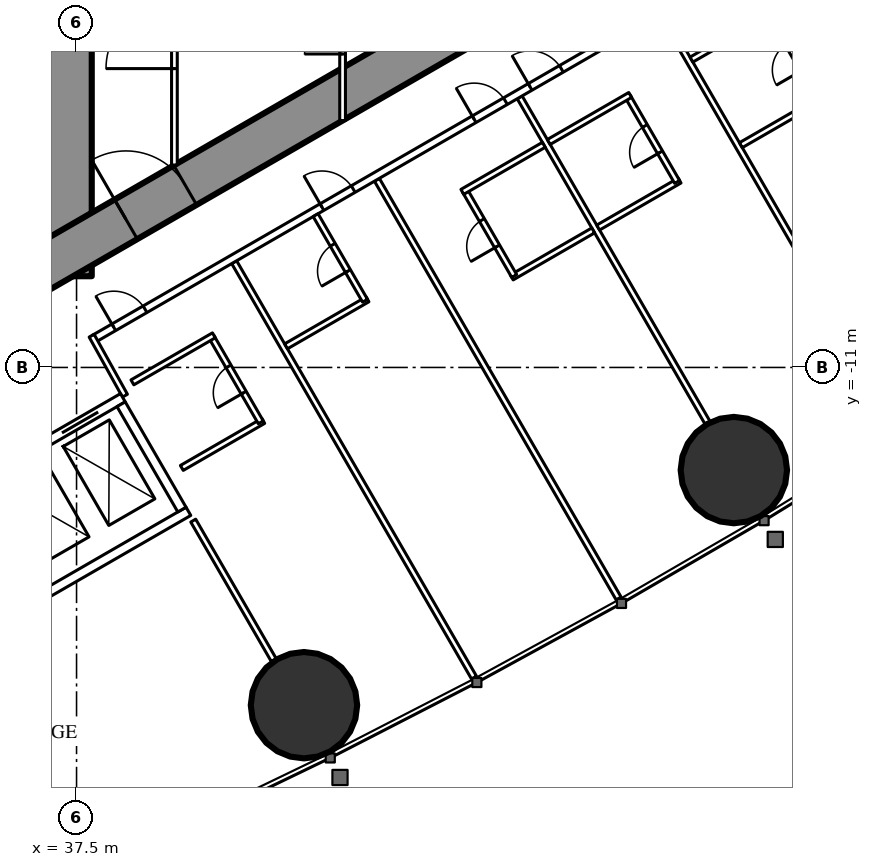
"""IFC4 building model, lengths in metres.
Left out: names, types, materials, properties, quantities, classifications, styles, units other than length and angle.
Written with IfcOpenShell. Run it as: python <this file> out.ifc"""

import sys

from ifc_helpers import new_model, si_unit, direction, frame, frame_2d, origin, origin_2d, place, context, subcontext, project, spatial, rectangle, hollow_circle, extrude, element, fill, save


model = new_model("IFC4")
c1 = context("Model", 3, precision=1e-05, world=origin(), true_north=direction((0.0, 1.0)))
c2 = subcontext(c1, "Body", "Model", "MODEL_VIEW")
j1 = project(units=[si_unit("LENGTHUNIT", "METRE"), si_unit("PLANEANGLEUNIT", "RADIAN")], contexts=[c1])
p1 = place(None, origin())
s1 = spatial("IfcSite", under=j1, at=p1, CompositionType="ELEMENT")
p2 = place(p1, origin())
s2 = spatial("IfcBuilding", under=s1, at=p2, CompositionType="ELEMENT")
p3 = place(p2, frame((0.0, 0.0, 53.0)))
s3 = spatial("IfcBuildingStorey", under=s2, at=p3, CompositionType="ELEMENT", Elevation=53.0)
for number, where, z_axis, x_axis in (
    (1, (43.484, -19.886, 0.0), (0.0, 0.0, 1.0), (1.0, 0.0, 0.0)),
    (2, (54.795, -13.701, 0.0), (0.0, 0.0, 1.0), (1.0, 0.0, 0.0)),
):
    element("IfcColumn", number, at=place(p3, frame(where, z_axis=z_axis, x_axis=x_axis)), inside=s3, PredefinedType="COLUMN", context=c2, shape_type="SweptSolid", body=[
        extrude(hollow_circle(Radius=1.4, WallThickness=0.12, at=origin_2d()), origin(), (0.0, 0.0, 1.0), 3.5),
    ])
p4 = place(p3, frame((37.3, -8.6, 0.0), z_axis=(0.0, 0.0, 1.0), x_axis=(0.0, 1.0, 0.0)))
e3 = element("IfcWall", 3, at=p4, inside=s3, PredefinedType="SHEAR", context=c2, shape_type="SweptSolid", body=[
    extrude(rectangle(XDim=17.2, YDim=1.2, at=frame_2d((8.6, 0.0))), origin(), (0.0, 0.0, 1.0), 3.5),
])
p5 = place(p4, frame((7.7, 0.0, 0.0)))
e4 = element("IfcOpeningElement", 4, at=p5, cuts=e3, PredefinedType="OPENING", context=c2, shape_type="SweptSolid", body=[
    extrude(rectangle(XDim=1.8, YDim=2.2, at=frame_2d((0.9, 1.1))), frame((0.0, 0.61, 0.0), z_axis=(0.0, -1.0, 0.0), x_axis=(1.0, 0.0, 0.0)), (0.0, 0.0, 1.0), 1.22),
])
p6 = place(p3, frame((27.2, -13.8, 0.0), z_axis=(0.0, 0.0, 1.0), x_axis=(0.866027159892, 0.499996958321, 0.0)))
e5 = element("IfcWall", 5, at=p6, inside=s3, PredefinedType="SHEAR", context=c2, shape_type="SweptSolid", body=[
    extrude(rectangle(XDim=27.947, YDim=1.2, at=frame_2d((13.973, 0.0))), origin(), (0.0, 0.0, 1.0), 3.5),
])
p7 = place(p6, frame((4.6, 0.0, 0.0)))
e6 = element("IfcOpeningElement", 6, at=p7, cuts=e5, PredefinedType="OPENING", context=c2, shape_type="SweptSolid", body=[
    extrude(rectangle(XDim=1.0, YDim=2.2, at=frame_2d((0.5, 1.1))), frame((0.0, 0.61, 0.0), z_axis=(0.0, -1.0, 0.0), x_axis=(1.0, 0.0, 0.0)), (0.0, 0.0, 1.0), 1.22),
])
p8 = place(p6, frame((13.395, 0.0, 0.0)))
e7 = element("IfcOpeningElement", 7, at=p8, cuts=e5, PredefinedType="OPENING", context=c2, shape_type="SweptSolid", body=[
    extrude(rectangle(XDim=1.8, YDim=2.2, at=frame_2d((0.9, 1.1))), frame((0.0, 0.61, 0.0), z_axis=(0.0, -1.0, 0.0), x_axis=(1.0, 0.0, 0.0)), (0.0, 0.0, 1.0), 1.22),
])
p9 = place(p3, frame((41.647, -8.23, 0.0), z_axis=(0.0, 0.0, 1.0), x_axis=(0.49998590462, -0.866033541603, 0.0)))
e8 = element("IfcWall", 8, at=p9, inside=s3, PredefinedType="PARTITIONING", context=c2, shape_type="SweptSolid", body=[
    extrude(rectangle(XDim=12.621, YDim=0.15, at=frame_2d((6.311, 0.0))), origin(), (0.0, 0.0, 1.0), 3.25),
])
p10 = place(p3, frame((45.403, -6.062, 0.0), z_axis=(0.0, 0.0, 1.0), x_axis=(0.500007077968, -0.866021317279, 0.0)))
e9 = element("IfcWall", 9, at=p10, inside=s3, PredefinedType="PARTITIONING", context=c2, shape_type="SweptSolid", body=[
    extrude(rectangle(XDim=12.721, YDim=0.15, at=frame_2d((6.361, 0.0))), origin(), (0.0, 0.0, 1.0), 3.25),
])
p11 = place(p3, frame((49.159, -3.893, 0.0), z_axis=(0.0, 0.0, 1.0), x_axis=(0.499998773722, -0.866026111775, 0.0)))
e10 = element("IfcWall", 10, at=p11, inside=s3, PredefinedType="PARTITIONING", context=c2, shape_type="SweptSolid", body=[
    extrude(rectangle(XDim=9.892, YDim=0.15, at=frame_2d((4.946, 0.0))), origin(), (0.0, 0.0, 1.0), 2.25),
])
p12 = place(p3, frame((52.915, -1.725, 0.0), z_axis=(0.0, 0.0, 1.0), x_axis=(0.499997163113, -0.866027041656, 0.0)))
e11 = element("IfcWall", 11, at=p12, inside=s3, PredefinedType="PARTITIONING", context=c2, shape_type="SweptSolid", body=[
    extrude(rectangle(XDim=12.591, YDim=0.15, at=frame_2d((6.295, 0.0))), origin(), (0.0, 0.0, 1.0), 3.25),
])
p13 = place(p3, frame((40.57, -15.03, 0.0), z_axis=(0.0, 0.0, 1.0), x_axis=(0.500012993597, -0.866017901798, 0.0)))
e12 = element("IfcWall", 12, at=p13, inside=s3, PredefinedType="PARTITIONING", context=c2, shape_type="SweptSolid", body=[
    extrude(rectangle(XDim=4.243, YDim=0.15, at=frame_2d((2.122, 0.0))), origin(), (0.0, 0.0, 1.0), 3.25),
])
p14 = place(p3, frame((37.96, -10.243, 0.0), z_axis=(0.0, 0.0, 1.0), x_axis=(0.866026429433, 0.499998223521, 0.0)))
e13 = element("IfcWall", 13, at=p14, inside=s3, PredefinedType="PARTITIONING", context=c2, shape_type="SweptSolid", body=[
    extrude(rectangle(XDim=20.487, YDim=0.2, at=frame_2d((10.243, 0.0))), origin(), (0.0, 0.0, 1.0), 3.25),
])
p15 = place(p14, frame((6.925, 0.0, 0.0)))
e14 = element("IfcOpeningElement", 14, at=p15, cuts=e13, PredefinedType="OPENING", context=c2, shape_type="SweptSolid", body=[
    extrude(rectangle(XDim=0.95, YDim=2.2, at=frame_2d((0.475, 1.1))), frame((0.0, 0.11, 0.0), z_axis=(0.0, -1.0, 0.0), x_axis=(1.0, 0.0, 0.0)), (0.0, 0.0, 1.0), 0.22),
])
p16 = place(p14, frame((11.549, 0.0, 0.0)))
e15 = element("IfcOpeningElement", 15, at=p16, cuts=e13, PredefinedType="OPENING", context=c2, shape_type="SweptSolid", body=[
    extrude(rectangle(XDim=0.95, YDim=2.2, at=frame_2d((0.475, 1.1))), frame((0.0, 0.11, 0.0), z_axis=(0.0, -1.0, 0.0), x_axis=(1.0, 0.0, 0.0)), (0.0, 0.0, 1.0), 0.22),
])
p17 = place(p14, frame((13.249, 0.0, 0.0)))
e16 = element("IfcOpeningElement", 16, at=p17, cuts=e13, PredefinedType="OPENING", context=c2, shape_type="SweptSolid", body=[
    extrude(rectangle(XDim=0.95, YDim=2.2, at=frame_2d((0.475, 1.1))), frame((0.0, 0.11, 0.0), z_axis=(0.0, -1.0, 0.0), x_axis=(1.0, 0.0, 0.0)), (0.0, 0.0, 1.0), 0.22),
])
p18 = place(p14, frame((17.585, 0.0, 0.0)))
e17 = element("IfcOpeningElement", 17, at=p18, cuts=e13, PredefinedType="OPENING", context=c2, shape_type="SweptSolid", body=[
    extrude(rectangle(XDim=0.95, YDim=2.2, at=frame_2d((0.475, 1.1))), frame((0.0, 0.11, 0.0), z_axis=(0.0, -1.0, 0.0), x_axis=(1.0, 0.0, 0.0)), (0.0, 0.0, 1.0), 0.22),
])
p19 = place(p14, frame((0.6, 0.0, 0.0)))
e18 = element("IfcOpeningElement", 18, at=p19, cuts=e13, PredefinedType="OPENING", context=c2, shape_type="SweptSolid", body=[
    extrude(rectangle(XDim=0.95, YDim=2.2, at=frame_2d((0.475, 1.1))), frame((0.0, 0.11, 0.0), z_axis=(0.0, -1.0, 0.0), x_axis=(1.0, 0.0, 0.0)), (0.0, 0.0, 1.0), 0.22),
])
p20 = place(p3, frame((38.773, -11.742, 0.0), z_axis=(0.0, 0.0, 1.0), x_axis=(-0.485528096672, 0.8742210632, 0.0)))
e19 = element("IfcWall", 19, at=p20, inside=s3, PredefinedType="PARTITIONING", context=c2, shape_type="SweptSolid", body=[
    extrude(rectangle(XDim=1.805, YDim=0.15, at=frame_2d((0.903, 0.0))), origin(), (0.0, 0.0, 1.0), 3.25),
])
p21 = place(p3, frame((43.012, -10.444, 0.0), z_axis=(0.0, 0.0, 1.0), x_axis=(0.866031185235, 0.4999899861, 0.0)))
e20 = element("IfcWall", 20, at=p21, inside=s3, PredefinedType="PARTITIONING", context=c2, shape_type="SweptSolid", body=[
    extrude(rectangle(XDim=2.475, YDim=0.15, at=frame_2d((1.238, 0.0))), origin(), (0.0, 0.0, 1.0), 3.25),
])
p22 = place(p3, frame((43.791, -6.993, 0.0), z_axis=(0.0, 0.0, 1.0), x_axis=(0.500047596559, -0.865997922154, 0.0)))
e21 = element("IfcWall", 21, at=p22, inside=s3, PredefinedType="PARTITIONING", context=c2, shape_type="SweptSolid", body=[
    extrude(rectangle(XDim=2.6, YDim=0.15, at=frame_2d((1.3, 0.0))), origin(), (0.0, 0.0, 1.0), 3.25),
])
p23 = place(p22, frame((0.9, 0.0, 0.0)))
e22 = element("IfcOpeningElement", 22, at=p23, cuts=e21, PredefinedType="OPENING", context=c2, shape_type="SweptSolid", body=[
    extrude(rectangle(XDim=0.8, YDim=2.2, at=frame_2d((0.4, 1.1))), frame((0.0, 0.085, 0.0), z_axis=(0.0, -1.0, 0.0), x_axis=(1.0, 0.0, 0.0)), (0.0, 0.0, 1.0), 0.17),
])
p24 = place(p3, frame((48.951, -8.632, 0.0), z_axis=(0.0, 0.0, 1.0), x_axis=(0.866006523861, 0.500032699561, 0.0)))
e23 = element("IfcWall", 23, at=p24, inside=s3, PredefinedType="PARTITIONING", context=c2, shape_type="SweptSolid", body=[
    extrude(rectangle(XDim=2.475, YDim=0.15, at=frame_2d((1.237, 0.0))), origin(), (0.0, 0.0, 1.0), 3.25),
])
p25 = place(p3, frame((47.716, -6.343, 0.0), z_axis=(0.0, 0.0, 1.0), x_axis=(0.500006934395, -0.866021400173, 0.0)))
e24 = element("IfcWall", 24, at=p25, inside=s3, PredefinedType="PARTITIONING", context=c2, shape_type="SweptSolid", body=[
    extrude(rectangle(XDim=2.6, YDim=0.15, at=frame_2d((1.3, 0.0))), origin(), (0.0, 0.0, 1.0), 3.25),
])
p26 = place(p25, frame((0.9, 0.0, 0.0)))
e25 = element("IfcOpeningElement", 25, at=p26, cuts=e24, PredefinedType="OPENING", context=c2, shape_type="SweptSolid", body=[
    extrude(rectangle(XDim=0.8, YDim=2.2, at=frame_2d((0.4, 1.1))), frame((0.0, 0.085, 0.0), z_axis=(0.0, -1.0, 0.0), x_axis=(1.0, 0.0, 0.0)), (0.0, 0.0, 1.0), 0.17),
])
for number, where, z_axis, x_axis in (
    (26, (47.651, -6.38, 0.0), (0.0, 0.0, 1.0), (0.866, 0.5, 0.0)),
    (27, (51.224, -7.32, 0.0), (0.0, 0.0, 1.0), (0.866, 0.5, 0.0)),
):
    element("IfcWall", number, at=place(p3, frame(where, z_axis=z_axis, x_axis=x_axis)), inside=s3, PredefinedType="PARTITIONING", context=c2, shape_type="SweptSolid", body=[
        extrude(rectangle(XDim=2.475, YDim=0.15, at=frame_2d((1.238, 0.0))), origin(), (0.0, 0.0, 1.0), 3.25),
    ])
p27 = place(p3, frame((52.003, -3.868, 0.0), z_axis=(0.0, 0.0, 1.0), x_axis=(0.500047596559, -0.865997922154, 0.0)))
e28 = element("IfcWall", 28, at=p27, inside=s3, PredefinedType="PARTITIONING", context=c2, shape_type="SweptSolid", body=[
    extrude(rectangle(XDim=2.6, YDim=0.15, at=frame_2d((1.3, 0.0))), origin(), (0.0, 0.0, 1.0), 3.25),
])
p28 = place(p27, frame((0.9, 0.0, 0.0)))
e29 = element("IfcOpeningElement", 29, at=p28, cuts=e28, PredefinedType="OPENING", context=c2, shape_type="SweptSolid", body=[
    extrude(rectangle(XDim=0.8, YDim=2.2, at=frame_2d((0.4, 1.1))), frame((0.0, 0.085, 0.0), z_axis=(0.0, -1.0, 0.0), x_axis=(1.0, 0.0, 0.0)), (0.0, 0.0, 1.0), 0.17),
])
for number, where, z_axis, x_axis in (
    (30, (49.925, -5.068, 0.0), (0.0, 0.0, 1.0), (0.866, 0.5, 0.0)),
    (31, (54.98, -5.151, 0.0), (0.0, 0.0, 1.0), (0.866, 0.5, 0.0)),
):
    element("IfcWall", number, at=place(p3, frame(where, z_axis=z_axis, x_axis=x_axis)), inside=s3, PredefinedType="PARTITIONING", context=c2, shape_type="SweptSolid", body=[
        extrude(rectangle(XDim=2.475, YDim=0.15, at=frame_2d((1.237, 0.0))), origin(), (0.0, 0.0, 1.0), 3.25),
    ])
p29 = place(p3, frame((55.758, -1.7, 0.0), z_axis=(0.0, 0.0, 1.0), x_axis=(0.500006934395, -0.866021400173, 0.0)))
e32 = element("IfcWall", 32, at=p29, inside=s3, PredefinedType="PARTITIONING", context=c2, shape_type="SweptSolid", body=[
    extrude(rectangle(XDim=2.6, YDim=0.15, at=frame_2d((1.3, 0.0))), origin(), (0.0, 0.0, 1.0), 3.25),
])
p30 = place(p29, frame((0.9, 0.0, 0.0)))
e33 = element("IfcOpeningElement", 33, at=p30, cuts=e32, PredefinedType="OPENING", context=c2, shape_type="SweptSolid", body=[
    extrude(rectangle(XDim=0.8, YDim=2.2, at=frame_2d((0.4, 1.1))), frame((0.0, 0.085, 0.0), z_axis=(0.0, -1.0, 0.0), x_axis=(1.0, 0.0, 0.0)), (0.0, 0.0, 1.0), 0.17),
])
p31 = place(p3, frame((53.68, -2.9, 0.0), z_axis=(0.0, 0.0, 1.0), x_axis=(0.866006523861, 0.500032699561, 0.0)))
e34 = element("IfcWall", 34, at=p31, inside=s3, PredefinedType="PARTITIONING", context=c2, shape_type="SweptSolid", body=[
    extrude(rectangle(XDim=2.475, YDim=0.15, at=frame_2d((1.237, 0.0))), origin(), (0.0, 0.0, 1.0), 3.25),
])
p32 = place(p3, frame((40.27, -13.644, 0.0), z_axis=(0.0, 0.0, 1.0), x_axis=(0.866031185235, 0.4999899861, 0.0)))
e35 = element("IfcWall", 35, at=p32, inside=s3, PredefinedType="PARTITIONING", context=c2, shape_type="SweptSolid", body=[
    extrude(rectangle(XDim=2.475, YDim=0.15, at=frame_2d((1.238, 0.0))), origin(), (0.0, 0.0, 1.0), 3.25),
])
p33 = place(p3, frame((41.048, -10.193, 0.0), z_axis=(0.0, 0.0, 1.0), x_axis=(0.500047596559, -0.865997922154, 0.0)))
e36 = element("IfcWall", 36, at=p33, inside=s3, PredefinedType="PARTITIONING", context=c2, shape_type="SweptSolid", body=[
    extrude(rectangle(XDim=2.6, YDim=0.15, at=frame_2d((1.3, 0.0))), origin(), (0.0, 0.0, 1.0), 3.25),
])
p34 = place(p33, frame((0.9, 0.0, 0.0)))
e37 = element("IfcOpeningElement", 37, at=p34, cuts=e36, PredefinedType="OPENING", context=c2, shape_type="SweptSolid", body=[
    extrude(rectangle(XDim=0.8, YDim=2.2, at=frame_2d((0.4, 1.1))), frame((0.0, 0.085, 0.0), z_axis=(0.0, -1.0, 0.0), x_axis=(1.0, 0.0, 0.0)), (0.0, 0.0, 1.0), 0.17),
])
p35 = place(p3, frame((38.97, -11.393, 0.0), z_axis=(0.0, 0.0, 1.0), x_axis=(0.866031185235, 0.4999899861, 0.0)))
e38 = element("IfcWall", 38, at=p35, inside=s3, PredefinedType="PARTITIONING", context=c2, shape_type="SweptSolid", body=[
    extrude(rectangle(XDim=2.475, YDim=0.15, at=frame_2d((1.238, 0.0))), origin(), (0.0, 0.0, 1.0), 3.25),
])
p36 = place(p3, frame((40.075, -5.674, 0.0), z_axis=(0.0, 0.0, 1.0), x_axis=(0.0, 1.0, 0.0)))
e39 = element("IfcWall", 39, at=p36, inside=s3, PredefinedType="PARTITIONING", context=c2, shape_type="SweptSolid", body=[
    extrude(rectangle(XDim=6.874, YDim=0.15, at=frame_2d((3.437, 0.0))), origin(), (0.0, 0.0, 1.0), 3.25),
])
p37 = place(p36, frame((2.537, 0.0, 0.0)))
e40 = element("IfcOpeningElement", 40, at=p37, cuts=e39, PredefinedType="OPENING", context=c2, shape_type="SweptSolid", body=[
    extrude(rectangle(XDim=1.8, YDim=2.2, at=frame_2d((0.9, 1.1))), frame((0.0, 0.085, 0.0), z_axis=(0.0, -1.0, 0.0), x_axis=(1.0, 0.0, 0.0)), (0.0, 0.0, 1.0), 0.17),
])
p38 = place(p3, frame((44.5, -4.505, 0.0), z_axis=(0.0, 0.0, 1.0), x_axis=(0.0, 1.0, 0.0)))
e41 = element("IfcWall", 41, at=p38, inside=s3, PredefinedType="PARTITIONING", context=c2, shape_type="SweptSolid", body=[
    extrude(rectangle(XDim=9.009, YDim=0.15, at=frame_2d((4.505, 0.0))), origin(), (0.0, 0.0, 1.0), 2.45),
])
p39 = place(p38, frame((1.752, 0.0, 0.0)))
e42 = element("IfcOpeningElement", 42, at=p39, cuts=e41, PredefinedType="OPENING", context=c2, shape_type="SweptSolid", body=[
    extrude(rectangle(XDim=1.0, YDim=2.2, at=frame_2d((0.5, 1.1))), frame((0.0, 0.085, 0.0), z_axis=(0.0, -1.0, 0.0), x_axis=(1.0, 0.0, 0.0)), (0.0, 0.0, 1.0), 0.17),
])
p40 = place(p38, frame((6.257, 0.0, 0.0)))
e43 = element("IfcOpeningElement", 43, at=p40, cuts=e41, PredefinedType="OPENING", context=c2, shape_type="SweptSolid", body=[
    extrude(rectangle(XDim=1.0, YDim=2.2, at=frame_2d((0.5, 1.1))), frame((0.0, 0.085, 0.0), z_axis=(0.0, -1.0, 0.0), x_axis=(1.0, 0.0, 0.0)), (0.0, 0.0, 1.0), 0.17),
])
p41 = place(p3, frame((31.271, -16.097, 0.0), z_axis=(0.0, 0.0, 1.0), x_axis=(0.86604045752, 0.499973925258, 0.0)))
e44 = element("IfcWall", 44, at=p41, inside=s3, PredefinedType="PARTITIONING", context=c2, shape_type="SweptSolid", body=[
    extrude(rectangle(XDim=8.6, YDim=0.25, at=frame_2d((4.3, 0.0))), origin(), (0.0, 0.0, 1.0), 3.25),
])
p42 = place(p41, frame((0.75, 0.0, 0.0)))
e45 = element("IfcOpeningElement", 45, at=p42, cuts=e44, PredefinedType="OPENING", context=c2, shape_type="SweptSolid", body=[
    extrude(rectangle(XDim=1.1, YDim=2.2, at=frame_2d((0.55, 1.1))), frame((0.0, 0.135, 0.0), z_axis=(0.0, -1.0, 0.0), x_axis=(1.0, 0.0, 0.0)), (0.0, 0.0, 1.0), 0.27),
])
p43 = place(p41, frame((2.75, 0.0, 0.0)))
e46 = element("IfcOpeningElement", 46, at=p43, cuts=e44, PredefinedType="OPENING", context=c2, shape_type="SweptSolid", body=[
    extrude(rectangle(XDim=1.1, YDim=2.2, at=frame_2d((0.55, 1.1))), frame((0.0, 0.135, 0.0), z_axis=(0.0, -1.0, 0.0), x_axis=(1.0, 0.0, 0.0)), (0.0, 0.0, 1.0), 0.27),
])
p44 = place(p41, frame((4.75, 0.0, 0.0)))
e47 = element("IfcOpeningElement", 47, at=p44, cuts=e44, PredefinedType="OPENING", context=c2, shape_type="SweptSolid", body=[
    extrude(rectangle(XDim=1.1, YDim=2.2, at=frame_2d((0.55, 1.1))), frame((0.0, 0.135, 0.0), z_axis=(0.0, -1.0, 0.0), x_axis=(1.0, 0.0, 0.0)), (0.0, 0.0, 1.0), 0.27),
])
p45 = place(p41, frame((6.75, 0.0, 0.0)))
e48 = element("IfcOpeningElement", 48, at=p45, cuts=e44, PredefinedType="OPENING", context=c2, shape_type="SweptSolid", body=[
    extrude(rectangle(XDim=1.1, YDim=2.2, at=frame_2d((0.55, 1.1))), frame((0.0, 0.135, 0.0), z_axis=(0.0, -1.0, 0.0), x_axis=(1.0, 0.0, 0.0)), (0.0, 0.0, 1.0), 0.27),
])
p46 = place(p3, frame((32.996, -19.086, 0.0), z_axis=(0.0, 0.0, 1.0), x_axis=(0.866028165386, 0.499995216735, 0.0)))
e49 = element("IfcWall", 49, at=p46, inside=s3, PredefinedType="PARTITIONING", context=c2, shape_type="SweptSolid", body=[
    extrude(rectangle(XDim=8.6, YDim=0.25, at=frame_2d((4.3, 0.0))), origin(), (0.0, 0.0, 1.0), 3.25),
])
p47 = place(p3, frame((38.673, -11.968, 0.0), z_axis=(0.0, 0.0, 1.0), x_axis=(0.499929347863, -0.866066190972, 0.0)))
e50 = element("IfcWall", 50, at=p47, inside=s3, PredefinedType="PARTITIONING", context=c2, shape_type="SweptSolid", body=[
    extrude(rectangle(XDim=3.201, YDim=0.25, at=frame_2d((1.6, 0.0))), origin(), (0.0, 0.0, 1.0), 3.25),
])
p48 = place(p23, origin())
e51 = element("IfcDoor", 51, at=p48, inside=s3, OperationType="SINGLE_SWING_RIGHT", PredefinedType="DOOR", context=c2, shape_type="SweptSolid", body=[
    extrude(rectangle(XDim=0.8, YDim=2.2, at=frame_2d((0.4, 1.1))), frame((0.0, 0.025, 0.0), z_axis=(0.0, -1.0, 0.0), x_axis=(1.0, 0.0, 0.0)), (0.0, 0.0, 1.0), 0.05),
])
fill(e22, e51)
p49 = place(p15, origin())
e52 = element("IfcDoor", 52, at=p49, inside=s3, OperationType="SINGLE_SWING_LEFT", PredefinedType="DOOR", context=c2, shape_type="SweptSolid", body=[
    extrude(rectangle(XDim=0.95, YDim=2.2, at=frame_2d((0.475, 1.1))), frame((0.0, 0.025, 0.0), z_axis=(0.0, -1.0, 0.0), x_axis=(1.0, 0.0, 0.0)), (0.0, 0.0, 1.0), 0.05),
])
fill(e14, e52)
p50 = place(p26, origin())
e53 = element("IfcDoor", 53, at=p50, inside=s3, OperationType="SINGLE_SWING_RIGHT", PredefinedType="DOOR", context=c2, shape_type="SweptSolid", body=[
    extrude(rectangle(XDim=0.8, YDim=2.2, at=frame_2d((0.4, 1.1))), frame((0.0, 0.025, 0.0), z_axis=(0.0, -1.0, 0.0), x_axis=(1.0, 0.0, 0.0)), (0.0, 0.0, 1.0), 0.05),
])
fill(e25, e53)
p51 = place(p16, origin())
e54 = element("IfcDoor", 54, at=p51, inside=s3, OperationType="SINGLE_SWING_LEFT", PredefinedType="DOOR", context=c2, shape_type="SweptSolid", body=[
    extrude(rectangle(XDim=0.95, YDim=2.2, at=frame_2d((0.475, 1.1))), frame((0.0, 0.025, 0.0), z_axis=(0.0, -1.0, 0.0), x_axis=(1.0, 0.0, 0.0)), (0.0, 0.0, 1.0), 0.05),
])
fill(e15, e54)
p52 = place(p28, origin())
e55 = element("IfcDoor", 55, at=p52, inside=s3, OperationType="SINGLE_SWING_RIGHT", PredefinedType="DOOR", context=c2, shape_type="SweptSolid", body=[
    extrude(rectangle(XDim=0.8, YDim=2.2, at=frame_2d((0.4, 1.1))), frame((0.0, 0.025, 0.0), z_axis=(0.0, -1.0, 0.0), x_axis=(1.0, 0.0, 0.0)), (0.0, 0.0, 1.0), 0.05),
])
fill(e29, e55)
p53 = place(p17, origin())
e56 = element("IfcDoor", 56, at=p53, inside=s3, OperationType="SINGLE_SWING_LEFT", PredefinedType="DOOR", context=c2, shape_type="SweptSolid", body=[
    extrude(rectangle(XDim=0.95, YDim=2.2, at=frame_2d((0.475, 1.1))), frame((0.0, 0.025, 0.0), z_axis=(0.0, -1.0, 0.0), x_axis=(1.0, 0.0, 0.0)), (0.0, 0.0, 1.0), 0.05),
])
fill(e16, e56)
p54 = place(p30, origin())
e57 = element("IfcDoor", 57, at=p54, inside=s3, OperationType="SINGLE_SWING_RIGHT", PredefinedType="DOOR", context=c2, shape_type="SweptSolid", body=[
    extrude(rectangle(XDim=0.8, YDim=2.2, at=frame_2d((0.4, 1.1))), frame((0.0, 0.025, 0.0), z_axis=(0.0, -1.0, 0.0), x_axis=(1.0, 0.0, 0.0)), (0.0, 0.0, 1.0), 0.05),
])
fill(e33, e57)
p55 = place(p34, origin())
e58 = element("IfcDoor", 58, at=p55, inside=s3, OperationType="SINGLE_SWING_RIGHT", PredefinedType="DOOR", context=c2, shape_type="SweptSolid", body=[
    extrude(rectangle(XDim=0.8, YDim=2.2, at=frame_2d((0.4, 1.1))), frame((0.0, 0.025, 0.0), z_axis=(0.0, -1.0, 0.0), x_axis=(1.0, 0.0, 0.0)), (0.0, 0.0, 1.0), 0.05),
])
fill(e37, e58)
p56 = place(p19, origin())
e59 = element("IfcDoor", 59, at=p56, inside=s3, OperationType="SINGLE_SWING_LEFT", PredefinedType="DOOR", context=c2, shape_type="SweptSolid", body=[
    extrude(rectangle(XDim=0.95, YDim=2.2, at=frame_2d((0.475, 1.1))), frame((0.0, 0.025, 0.0), z_axis=(0.0, -1.0, 0.0), x_axis=(1.0, 0.0, 0.0)), (0.0, 0.0, 1.0), 0.05),
])
fill(e18, e59)
p57 = place(p37, origin())
e60 = element("IfcDoor", 60, at=p57, inside=s3, OperationType="DOUBLE_DOOR_SINGLE_SWING", PredefinedType="DOOR", context=c2, shape_type="SweptSolid", body=[
    extrude(rectangle(XDim=1.8, YDim=2.2, at=frame_2d((0.9, 1.1))), frame((0.0, 0.025, 0.0), z_axis=(0.0, -1.0, 0.0), x_axis=(1.0, 0.0, 0.0)), (0.0, 0.0, 1.0), 0.05),
])
fill(e40, e60)
p58 = place(p39, origin())
e61 = element("IfcDoor", 61, at=p58, inside=s3, OperationType="SINGLE_SWING_LEFT", PredefinedType="DOOR", context=c2, shape_type="SweptSolid", body=[
    extrude(rectangle(XDim=1.0, YDim=2.2, at=frame_2d((0.5, 1.1))), frame((0.0, 0.025, 0.0), z_axis=(0.0, -1.0, 0.0), x_axis=(1.0, 0.0, 0.0)), (0.0, 0.0, 1.0), 0.05),
])
fill(e42, e61)
p59 = place(p8, origin())
e62 = element("IfcDoor", 62, at=p59, inside=s3, OperationType="DOUBLE_DOOR_SINGLE_SWING", PredefinedType="DOOR", context=c2, shape_type="SweptSolid", body=[
    extrude(rectangle(XDim=1.8, YDim=2.2, at=frame_2d((0.9, 1.1))), frame((0.0, 0.025, 0.0), z_axis=(0.0, -1.0, 0.0), x_axis=(1.0, 0.0, 0.0)), (0.0, 0.0, 1.0), 0.05),
])
fill(e7, e62)
p60 = place(p45, origin())
e63 = element("IfcDoor", 63, at=p60, inside=s3, OperationType="DOUBLE_DOOR_SLIDING", PredefinedType="USERDEFINED", context=c2, shape_type="SweptSolid", body=[
    extrude(rectangle(XDim=1.1, YDim=2.2, at=frame_2d((0.55, 1.1))), frame((0.0, 0.025, 0.0), z_axis=(0.0, -1.0, 0.0), x_axis=(1.0, 0.0, 0.0)), (0.0, 0.0, 1.0), 0.05),
])
fill(e48, e63)
save(model, sys.argv[1])
